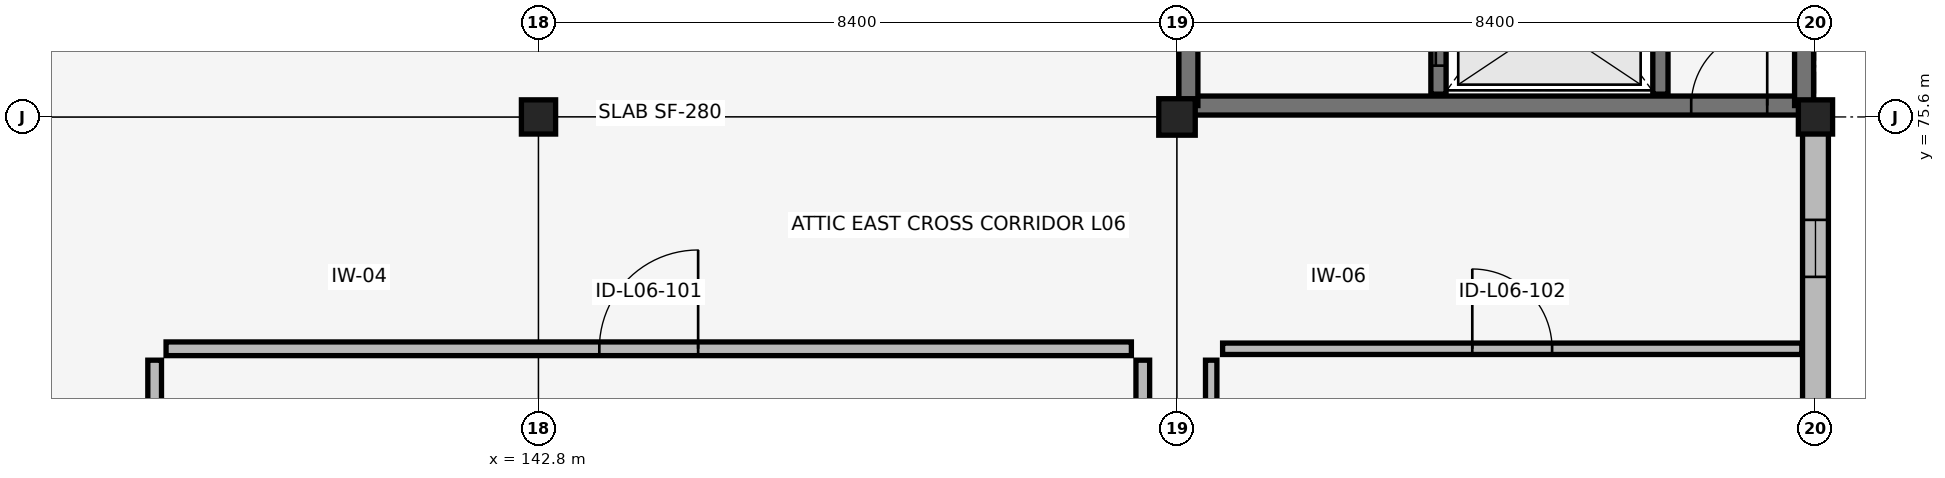
"""IFC4 building model, lengths in metres.
Left out: names, types, materials, properties, quantities, classifications, styles, units other than length and angle.
Written with IfcOpenShell. Run it as: python <this file> out.ifc"""

import sys

from ifc_helpers import new_model, si_unit, direction, frame, frame_2d, origin, origin_2d, place, context, subcontext, project, spatial, rectangle, extrude, element, fill, save


model = new_model("IFC4")
c1 = context("Model", 3, precision=1e-05, world=origin(), true_north=direction((0.0, 1.0)))
c2 = subcontext(c1, "Body", "Model", "MODEL_VIEW")
j1 = project(units=[si_unit("LENGTHUNIT", "METRE"), si_unit("PLANEANGLEUNIT", "RADIAN")], contexts=[c1])
p1 = place(None, origin())
s1 = spatial("IfcSite", under=j1, at=p1, CompositionType="ELEMENT")
p2 = place(p1, origin())
s2 = spatial("IfcBuilding", under=s1, at=p2, CompositionType="ELEMENT")
p3 = place(p2, frame((0.0, 0.0, 26.18)))
s3 = spatial("IfcBuildingStorey", under=s2, at=p3, CompositionType="ELEMENT", Elevation=26.18)
p4 = place(p3, frame((151.35, 75.75, 0.0), z_axis=(0.0, 0.0, 1.0), x_axis=(1.0, 0.0, 0.0)))
e1 = element("IfcWall", 1, at=p4, inside=s3, PredefinedType="SHEAR", context=c2, shape_type="SweptSolid", body=[
    extrude(rectangle(XDim=8.1, YDim=0.25, at=frame_2d((4.05, 0.0))), origin(), (0.0, 0.0, 1.0), 3.84),
])
p5 = place(p4, frame((6.615, 0.0, 0.0)))
e2 = element("IfcOpeningElement", 2, at=p5, cuts=e1, PredefinedType="OPENING", context=c2, shape_type="SweptSolid", body=[
    extrude(rectangle(XDim=1.0, YDim=2.15, at=frame_2d((0.5, 1.075))), frame((0.0, 0.135, 0.0), z_axis=(0.0, -1.0, 0.0), x_axis=(1.0, 0.0, 0.0)), (0.0, 0.0, 1.0), 0.27),
])
p6 = place(p3, frame((151.35, 75.75, 0.0), z_axis=(0.0, 0.0, 1.0), x_axis=(0.0, 1.0, 0.0)))
e3 = element("IfcWall", 3, at=p6, inside=s3, PredefinedType="SHEAR", context=c2, shape_type="SweptSolid", body=[
    extrude(rectangle(XDim=8.1, YDim=0.25, at=frame_2d((4.05, 0.0))), origin(), (0.0, 0.0, 1.0), 3.84),
])
p7 = place(p6, frame((1.325, 0.0, 0.0)))
e4 = element("IfcOpeningElement", 4, at=p7, cuts=e3, PredefinedType="OPENING", context=c2, shape_type="SweptSolid", body=[
    extrude(rectangle(XDim=1.45, YDim=2.15, at=frame_2d((0.725, 1.075))), frame((0.0, 0.135, 0.0), z_axis=(0.0, -1.0, 0.0), x_axis=(1.0, 0.0, 0.0)), (0.0, 0.0, 1.0), 0.27),
])
p8 = place(p3, frame((159.45, 75.75, 0.0), z_axis=(0.0, 0.0, 1.0), x_axis=(0.0, 1.0, 0.0)))
e5 = element("IfcWall", 5, at=p8, inside=s3, PredefinedType="SHEAR", context=c2, shape_type="SweptSolid", body=[
    extrude(rectangle(XDim=8.1, YDim=0.25, at=frame_2d((4.05, 0.0))), origin(), (0.0, 0.0, 1.0), 3.84),
])
p9 = place(p3, frame((142.8, 75.6, 0.0), z_axis=(0.0, 0.0, 1.0), x_axis=(1.0, 0.0, 0.0)))
e6 = element("IfcColumn", 6, at=p9, inside=s3, PredefinedType="COLUMN", context=c2, shape_type="SweptSolid", body=[
    extrude(rectangle(XDim=0.45, YDim=0.45, at=origin_2d()), origin(), (0.0, 0.0, 1.0), 3.84),
])
p10 = place(p3, frame((151.2, 75.6, 0.0), z_axis=(0.0, 0.0, 1.0), x_axis=(1.0, 0.0, 0.0)))
e7 = element("IfcColumn", 7, at=p10, inside=s3, PredefinedType="COLUMN", context=c2, shape_type="SweptSolid", body=[
    extrude(rectangle(XDim=0.48, YDim=0.48, at=origin_2d()), origin(), (0.0, 0.0, 1.0), 3.84),
])
p11 = place(p3, frame((159.6, 75.6, 0.0), z_axis=(0.0, 0.0, 1.0), x_axis=(1.0, 0.0, 0.0)))
e8 = element("IfcColumn", 8, at=p11, inside=s3, PredefinedType="COLUMN", context=c2, shape_type="SweptSolid", body=[
    extrude(rectangle(XDim=0.45, YDim=0.45, at=origin_2d()), origin(), (0.0, 0.0, 1.0), 3.84),
])
p12 = place(p3, frame((159.6, 67.395, 0.0), z_axis=(0.0, 0.0, 1.0), x_axis=(0.0, 1.0, 0.0)))
e9 = element("IfcWall", 9, at=p12, inside=s3, PredefinedType="SOLIDWALL", context=c2, shape_type="SweptSolid", body=[
    extrude(rectangle(XDim=7.995, YDim=0.34, at=frame_2d((3.998, 0.0))), origin(), (0.0, 0.0, 1.0), 3.48),
])
p13 = place(p12, frame((1.144, 0.0, 0.75)))
e10 = element("IfcOpeningElement", 10, at=p13, cuts=e9, PredefinedType="OPENING", context=c2, shape_type="SweptSolid", body=[
    extrude(rectangle(XDim=0.75, YDim=2.1, at=frame_2d((0.375, 1.05))), frame((0.0, 0.18, 0.0), z_axis=(0.0, -1.0, 0.0), x_axis=(1.0, 0.0, 0.0)), (0.0, 0.0, 1.0), 0.36),
])
p14 = place(p12, frame((2.743, 0.0, 0.75)))
e11 = element("IfcOpeningElement", 11, at=p14, cuts=e9, PredefinedType="OPENING", context=c2, shape_type="SweptSolid", body=[
    extrude(rectangle(XDim=0.75, YDim=2.1, at=frame_2d((0.375, 1.05))), frame((0.0, 0.18, 0.0), z_axis=(0.0, -1.0, 0.0), x_axis=(1.0, 0.0, 0.0)), (0.0, 0.0, 1.0), 0.36),
])
p15 = place(p12, frame((6.101, 0.0, 0.75)))
e12 = element("IfcOpeningElement", 12, at=p15, cuts=e9, PredefinedType="OPENING", context=c2, shape_type="SweptSolid", body=[
    extrude(rectangle(XDim=0.75, YDim=2.1, at=frame_2d((0.375, 1.05))), frame((0.0, 0.18, 0.0), z_axis=(0.0, -1.0, 0.0), x_axis=(1.0, 0.0, 0.0)), (0.0, 0.0, 1.0), 0.36),
])
p16 = place(p3, frame((154.64, 75.9, 0.0), z_axis=(0.0, 0.0, 1.0), x_axis=(0.0, 1.0, 0.0)))
e13 = element("IfcWall", 13, at=p16, inside=s3, PredefinedType="SHEAR", context=c2, shape_type="SweptSolid", body=[
    extrude(rectangle(XDim=3.8, YDim=0.2, at=frame_2d((1.9, 0.0))), origin(), (0.0, 0.0, 1.0), 3.84),
])
p17 = place(p16, frame((0.375, 0.0, 0.0)))
e14 = element("IfcOpeningElement", 14, at=p17, cuts=e13, PredefinedType="OPENING", context=c2, shape_type="SweptSolid", body=[
    extrude(rectangle(XDim=1.1, YDim=2.15, at=frame_2d((0.55, 1.075))), frame((0.0, 0.11, 0.0), z_axis=(0.0, -1.0, 0.0), x_axis=(1.0, 0.0, 0.0)), (0.0, 0.0, 1.0), 0.22),
])
p18 = place(p16, frame((2.325, 0.0, 0.0)))
e15 = element("IfcOpeningElement", 15, at=p18, cuts=e13, PredefinedType="OPENING", context=c2, shape_type="SweptSolid", body=[
    extrude(rectangle(XDim=1.1, YDim=2.15, at=frame_2d((0.55, 1.075))), frame((0.0, 0.11, 0.0), z_axis=(0.0, -1.0, 0.0), x_axis=(1.0, 0.0, 0.0)), (0.0, 0.0, 1.0), 0.22),
])
p19 = place(p3, frame((157.56, 75.9, 0.0), z_axis=(0.0, 0.0, 1.0), x_axis=(0.0, 1.0, 0.0)))
e16 = element("IfcWall", 16, at=p19, inside=s3, PredefinedType="SHEAR", context=c2, shape_type="SweptSolid", body=[
    extrude(rectangle(XDim=3.8, YDim=0.2, at=frame_2d((1.9, 0.0))), origin(), (0.0, 0.0, 1.0), 3.84),
])
p20 = place(p3, frame((137.9, 72.55, 0.0), z_axis=(0.0, 0.0, 1.0), x_axis=(1.0, 0.0, 0.0)))
e17 = element("IfcWall", 17, at=p20, inside=s3, PredefinedType="PARTITIONING", context=c2, shape_type="SweptSolid", body=[
    extrude(rectangle(XDim=12.7, YDim=0.18, at=frame_2d((6.35, 0.0))), origin(), (0.0, 0.0, 1.0), 3.48),
])
p21 = place(p20, frame((5.7, 0.0, 0.0)))
e18 = element("IfcOpeningElement", 18, at=p21, cuts=e17, PredefinedType="OPENING", context=c2, shape_type="SweptSolid", body=[
    extrude(rectangle(XDim=1.3, YDim=2.2, at=frame_2d((0.65, 1.1))), frame((0.0, 0.1, 0.0), z_axis=(0.0, -1.0, 0.0), x_axis=(1.0, 0.0, 0.0)), (0.0, 0.0, 1.0), 0.2),
])
for number, where, z_axis, x_axis in (
    (19, (137.75, 34.2, 0.0), (0.0, 0.0, 1.0), (0.0, 1.0, 0.0)),
    (20, (150.75, 34.2, 0.0), (0.0, 0.0, 1.0), (0.0, 1.0, 0.0)),
):
    element("IfcWall", number, at=place(p3, frame(where, z_axis=z_axis, x_axis=x_axis)), inside=s3, PredefinedType="PARTITIONING", context=c2, shape_type="SweptSolid", body=[
        extrude(rectangle(XDim=38.2, YDim=0.18, at=frame_2d((19.1, 0.0))), origin(), (0.0, 0.0, 1.0), 3.84),
    ])
p22 = place(p3, frame((151.8, 72.55, 0.0), z_axis=(0.0, 0.0, 1.0), x_axis=(1.0, 0.0, 0.0)))
e21 = element("IfcWall", 21, at=p22, inside=s3, PredefinedType="PARTITIONING", context=c2, shape_type="SweptSolid", body=[
    extrude(rectangle(XDim=7.62, YDim=0.15, at=frame_2d((3.81, 0.0))), origin(), (0.0, 0.0, 1.0), 3.48),
])
p23 = place(p22, frame((3.285, 0.0, 0.0)))
e22 = element("IfcOpeningElement", 22, at=p23, cuts=e21, PredefinedType="OPENING", context=c2, shape_type="SweptSolid", body=[
    extrude(rectangle(XDim=1.05, YDim=2.15, at=frame_2d((0.525, 1.075))), frame((0.0, 0.085, 0.0), z_axis=(0.0, -1.0, 0.0), x_axis=(1.0, 0.0, 0.0)), (0.0, 0.0, 1.0), 0.17),
])
p24 = place(p3, frame((151.65, 42.03, 0.0), z_axis=(0.0, 0.0, 1.0), x_axis=(0.0, 1.0, 0.0)))
e23 = element("IfcWall", 23, at=p24, inside=s3, PredefinedType="PARTITIONING", context=c2, shape_type="SweptSolid", body=[
    extrude(rectangle(XDim=30.37, YDim=0.15, at=frame_2d((15.185, 0.0))), origin(), (0.0, 0.0, 1.0), 3.84),
])
p25 = place(p15, origin())
e24 = element("IfcWindow", 24, at=p25, inside=s3, PartitioningType="DOUBLE_PANEL_VERTICAL", PredefinedType="WINDOW", context=c2, shape_type="SweptSolid", body=[
    extrude(rectangle(XDim=0.75, YDim=2.1, at=frame_2d((0.375, 1.05))), frame((0.0, 0.03, 0.0), z_axis=(0.0, -1.0, 0.0), x_axis=(1.0, 0.0, 0.0)), (0.0, 0.0, 1.0), 0.06),
])
fill(e12, e24)
p26 = place(p17, origin())
e25 = element("IfcDoor", 25, at=p26, inside=s3, OperationType="SLIDING_TO_LEFT", PredefinedType="DOOR", context=c2, shape_type="SweptSolid", body=[
    extrude(rectangle(XDim=1.1, YDim=2.15, at=frame_2d((0.55, 1.075))), frame((0.0, 0.025, 0.0), z_axis=(0.0, -1.0, 0.0), x_axis=(1.0, 0.0, 0.0)), (0.0, 0.0, 1.0), 0.05),
])
fill(e14, e25)
p27 = place(p5, origin())
e26 = element("IfcDoor", 26, at=p27, inside=s3, OperationType="SINGLE_SWING_RIGHT", PredefinedType="DOOR", context=c2, shape_type="SweptSolid", body=[
    extrude(rectangle(XDim=1.0, YDim=2.15, at=frame_2d((0.5, 1.075))), frame((0.0, 0.025, 0.0), z_axis=(0.0, -1.0, 0.0), x_axis=(1.0, 0.0, 0.0)), (0.0, 0.0, 1.0), 0.05),
])
fill(e2, e26)
p28 = place(p21, origin())
e27 = element("IfcDoor", 27, at=p28, inside=s3, OperationType="SINGLE_SWING_RIGHT", PredefinedType="DOOR", context=c2, shape_type="SweptSolid", body=[
    extrude(rectangle(XDim=1.3, YDim=2.2, at=frame_2d((0.65, 1.1))), frame((0.0, 0.025, 0.0), z_axis=(0.0, -1.0, 0.0), x_axis=(1.0, 0.0, 0.0)), (0.0, 0.0, 1.0), 0.05),
])
fill(e18, e27)
p29 = place(p23, origin())
e28 = element("IfcDoor", 28, at=p29, inside=s3, OperationType="SINGLE_SWING_LEFT", PredefinedType="DOOR", context=c2, shape_type="SweptSolid", body=[
    extrude(rectangle(XDim=1.05, YDim=2.15, at=frame_2d((0.525, 1.075))), frame((0.0, 0.025, 0.0), z_axis=(0.0, -1.0, 0.0), x_axis=(1.0, 0.0, 0.0)), (0.0, 0.0, 1.0), 0.05),
])
fill(e22, e28)
save(model, sys.argv[1])
